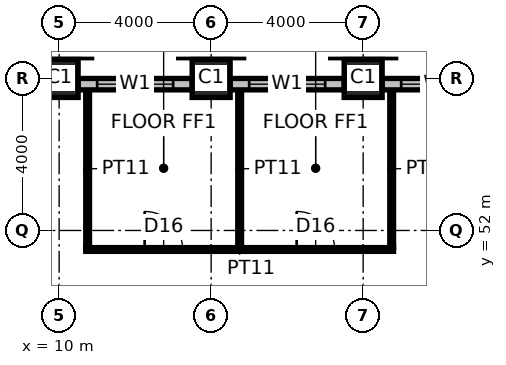
"""IFC4 building model, lengths in metres.
Left out: names, types, materials, properties, quantities, classifications, styles, units other than length and angle.
Written with IfcOpenShell. Run it as: python <this file> out.ifc"""

import sys

from ifc_helpers import new_model, si_unit, direction, frame, frame_2d, origin, origin_2d, place, context, subcontext, project, spatial, rectangle, hollow_rectangle, extrude, element, fill, save


model = new_model("IFC4")
c1 = context("Model", 3, precision=1e-05, world=origin(), true_north=direction((0.0, 1.0)))
c2 = subcontext(c1, "Body", "Model", "MODEL_VIEW")
j1 = project(units=[si_unit("LENGTHUNIT", "METRE"), si_unit("PLANEANGLEUNIT", "RADIAN")], contexts=[c1])
p1 = place(None, origin())
s1 = spatial("IfcSite", under=j1, at=p1, CompositionType="ELEMENT")
p2 = place(p1, origin())
s2 = spatial("IfcBuilding", under=s1, at=p2, CompositionType="ELEMENT")
p3 = place(p2, frame((0.0, 0.0, 179.8)))
s3 = spatial("IfcBuildingStorey", under=s2, at=p3, CompositionType="ELEMENT", Elevation=179.8)
for number, where, z_axis, x_axis in (
    (1, (10.0, 56.0, 0.0), (0.0, 0.0, 1.0), (1.0, 0.0, 0.0)),
    (2, (14.0, 56.0, 0.0), (0.0, 0.0, 1.0), (1.0, 0.0, 0.0)),
    (3, (18.0, 56.0, 0.0), (0.0, 0.0, 1.0), (1.0, 0.0, 0.0)),
):
    element("IfcColumn", number, at=place(p3, frame(where, z_axis=z_axis, x_axis=x_axis)), inside=s3, PredefinedType="COLUMN", context=c2, shape_type="SweptSolid", body=[
        extrude(hollow_rectangle(XDim=1.0, YDim=1.0, WallThickness=0.1, at=origin_2d()), origin(), (0.0, 0.0, 1.0), 4.0),
    ])
p4 = place(p3, frame((10.7, 51.5, 0.0), z_axis=(0.0, 0.0, 1.0), x_axis=(1.0, 0.0, 0.0)))
e4 = element("IfcWall", 4, at=p4, inside=s3, PredefinedType="PARTITIONING", context=c2, shape_type="SweptSolid", body=[
    extrude(rectangle(XDim=8.1, YDim=0.1, at=frame_2d((4.05, 0.0))), origin(), (0.0, 0.0, 1.0), 3.85),
])
p5 = place(p4, frame((1.55, 0.0, 0.0)))
e5 = element("IfcOpeningElement", 5, at=p5, cuts=e4, PredefinedType="OPENING", context=c2, shape_type="SweptSolid", body=[
    extrude(rectangle(XDim=1.0, YDim=2.2, at=frame_2d((0.5, 1.1))), frame((0.0, 0.06, 0.0), z_axis=(0.0, -1.0, 0.0), x_axis=(1.0, 0.0, 0.0)), (0.0, 0.0, 1.0), 0.12),
])
p6 = place(p4, frame((5.55, 0.0, 0.0)))
e6 = element("IfcOpeningElement", 6, at=p6, cuts=e4, PredefinedType="OPENING", context=c2, shape_type="SweptSolid", body=[
    extrude(rectangle(XDim=1.0, YDim=2.2, at=frame_2d((0.5, 1.1))), frame((0.0, 0.06, 0.0), z_axis=(0.0, -1.0, 0.0), x_axis=(1.0, 0.0, 0.0)), (0.0, 0.0, 1.0), 0.12),
])
for number, where, z_axis, x_axis in (
    (7, (10.75, 51.55, 0.0), (0.0, 0.0, 1.0), (0.0, 1.0, 0.0)),
    (8, (14.75, 51.55, 0.0), (0.0, 0.0, 1.0), (0.0, 1.0, 0.0)),
    (9, (18.75, 51.55, 0.0), (0.0, 0.0, 1.0), (0.0, 1.0, 0.0)),
):
    element("IfcWall", number, at=place(p3, frame(where, z_axis=z_axis, x_axis=x_axis)), inside=s3, PredefinedType="PARTITIONING", context=c2, shape_type="SweptSolid", body=[
        extrude(rectangle(XDim=4.15, YDim=0.1, at=frame_2d((2.075, 0.0))), origin(), (0.0, 0.0, 1.0), 3.85),
    ])
p7 = place(p3, frame((13.5, 55.85, 0.0), z_axis=(0.0, 0.0, 1.0), x_axis=(-1.0, 0.0, 0.0)))
e10 = element("IfcWall", 10, at=p7, inside=s3, PredefinedType="ELEMENTEDWALL", context=c2, shape_type="SweptSolid", body=[
    extrude(rectangle(XDim=3.0, YDim=0.3, at=frame_2d((1.5, 0.0))), origin(), (0.0, 0.0, 1.0), 2.85),
])
p8 = place(p7, frame((0.5, 0.0, 0.8)))
e11 = element("IfcOpeningElement", 11, at=p8, cuts=e10, PredefinedType="OPENING", context=c2, shape_type="SweptSolid", body=[
    extrude(rectangle(XDim=2.0, YDim=2.0, at=frame_2d((1.0, 1.0))), frame((0.0, 0.16, 0.0), z_axis=(0.0, -1.0, 0.0), x_axis=(1.0, 0.0, 0.0)), (0.0, 0.0, 1.0), 0.32),
])
p9 = place(p3, frame((17.5, 55.85, 0.0), z_axis=(0.0, 0.0, 1.0), x_axis=(-1.0, 0.0, 0.0)))
e12 = element("IfcWall", 12, at=p9, inside=s3, PredefinedType="ELEMENTEDWALL", context=c2, shape_type="SweptSolid", body=[
    extrude(rectangle(XDim=3.0, YDim=0.3, at=frame_2d((1.5, 0.0))), origin(), (0.0, 0.0, 1.0), 2.85),
])
p10 = place(p9, frame((0.5, 0.0, 0.8)))
e13 = element("IfcOpeningElement", 13, at=p10, cuts=e12, PredefinedType="OPENING", context=c2, shape_type="SweptSolid", body=[
    extrude(rectangle(XDim=2.0, YDim=2.0, at=frame_2d((1.0, 1.0))), frame((0.0, 0.16, 0.0), z_axis=(0.0, -1.0, 0.0), x_axis=(1.0, 0.0, 0.0)), (0.0, 0.0, 1.0), 0.32),
])
p11 = place(p3, frame((21.5, 55.85, 0.0), z_axis=(0.0, 0.0, 1.0), x_axis=(-1.0, 0.0, 0.0)))
e14 = element("IfcWall", 14, at=p11, inside=s3, PredefinedType="ELEMENTEDWALL", context=c2, shape_type="SweptSolid", body=[
    extrude(rectangle(XDim=3.0, YDim=0.3, at=frame_2d((1.5, 0.0))), origin(), (0.0, 0.0, 1.0), 2.85),
])
p12 = place(p11, frame((0.5, 0.0, 0.8)))
e15 = element("IfcOpeningElement", 15, at=p12, cuts=e14, PredefinedType="OPENING", context=c2, shape_type="SweptSolid", body=[
    extrude(rectangle(XDim=2.0, YDim=2.0, at=frame_2d((1.0, 1.0))), frame((0.0, 0.16, 0.0), z_axis=(0.0, -1.0, 0.0), x_axis=(1.0, 0.0, 0.0)), (0.0, 0.0, 1.0), 0.32),
])
p13 = place(p5, origin())
e16 = element("IfcDoor", 16, at=p13, inside=s3, OperationType="SINGLE_SWING_LEFT", PredefinedType="DOOR", context=c2, shape_type="SweptSolid", body=[
    extrude(rectangle(XDim=1.0, YDim=2.2, at=frame_2d((0.5, 1.1))), frame((0.0, 0.025, 0.0), z_axis=(0.0, -1.0, 0.0), x_axis=(1.0, 0.0, 0.0)), (0.0, 0.0, 1.0), 0.05),
])
fill(e5, e16)
p14 = place(p6, origin())
e17 = element("IfcDoor", 17, at=p14, inside=s3, OperationType="SINGLE_SWING_LEFT", PredefinedType="DOOR", context=c2, shape_type="SweptSolid", body=[
    extrude(rectangle(XDim=1.0, YDim=2.2, at=frame_2d((0.5, 1.1))), frame((0.0, 0.025, 0.0), z_axis=(0.0, -1.0, 0.0), x_axis=(1.0, 0.0, 0.0)), (0.0, 0.0, 1.0), 0.05),
])
fill(e6, e17)
p15 = place(p8, origin())
e18 = element("IfcWindow", 18, at=p15, inside=s3, PartitioningType="SINGLE_PANEL", PredefinedType="WINDOW", context=c2, shape_type="SweptSolid", body=[
    extrude(rectangle(XDim=2.0, YDim=2.0, at=frame_2d((1.0, 1.0))), frame((0.0, 0.03, 0.0), z_axis=(0.0, -1.0, 0.0), x_axis=(1.0, 0.0, 0.0)), (0.0, 0.0, 1.0), 0.06),
])
fill(e11, e18)
p16 = place(p10, origin())
e19 = element("IfcWindow", 19, at=p16, inside=s3, PartitioningType="SINGLE_PANEL", PredefinedType="WINDOW", context=c2, shape_type="SweptSolid", body=[
    extrude(rectangle(XDim=2.0, YDim=2.0, at=frame_2d((1.0, 1.0))), frame((0.0, 0.03, 0.0), z_axis=(0.0, -1.0, 0.0), x_axis=(1.0, 0.0, 0.0)), (0.0, 0.0, 1.0), 0.06),
])
fill(e13, e19)
p17 = place(p12, origin())
e20 = element("IfcWindow", 20, at=p17, inside=s3, PartitioningType="SINGLE_PANEL", PredefinedType="WINDOW", context=c2, shape_type="SweptSolid", body=[
    extrude(rectangle(XDim=2.0, YDim=2.0, at=frame_2d((1.0, 1.0))), frame((0.0, 0.03, 0.0), z_axis=(0.0, -1.0, 0.0), x_axis=(1.0, 0.0, 0.0)), (0.0, 0.0, 1.0), 0.06),
])
fill(e15, e20)
save(model, sys.argv[1])
